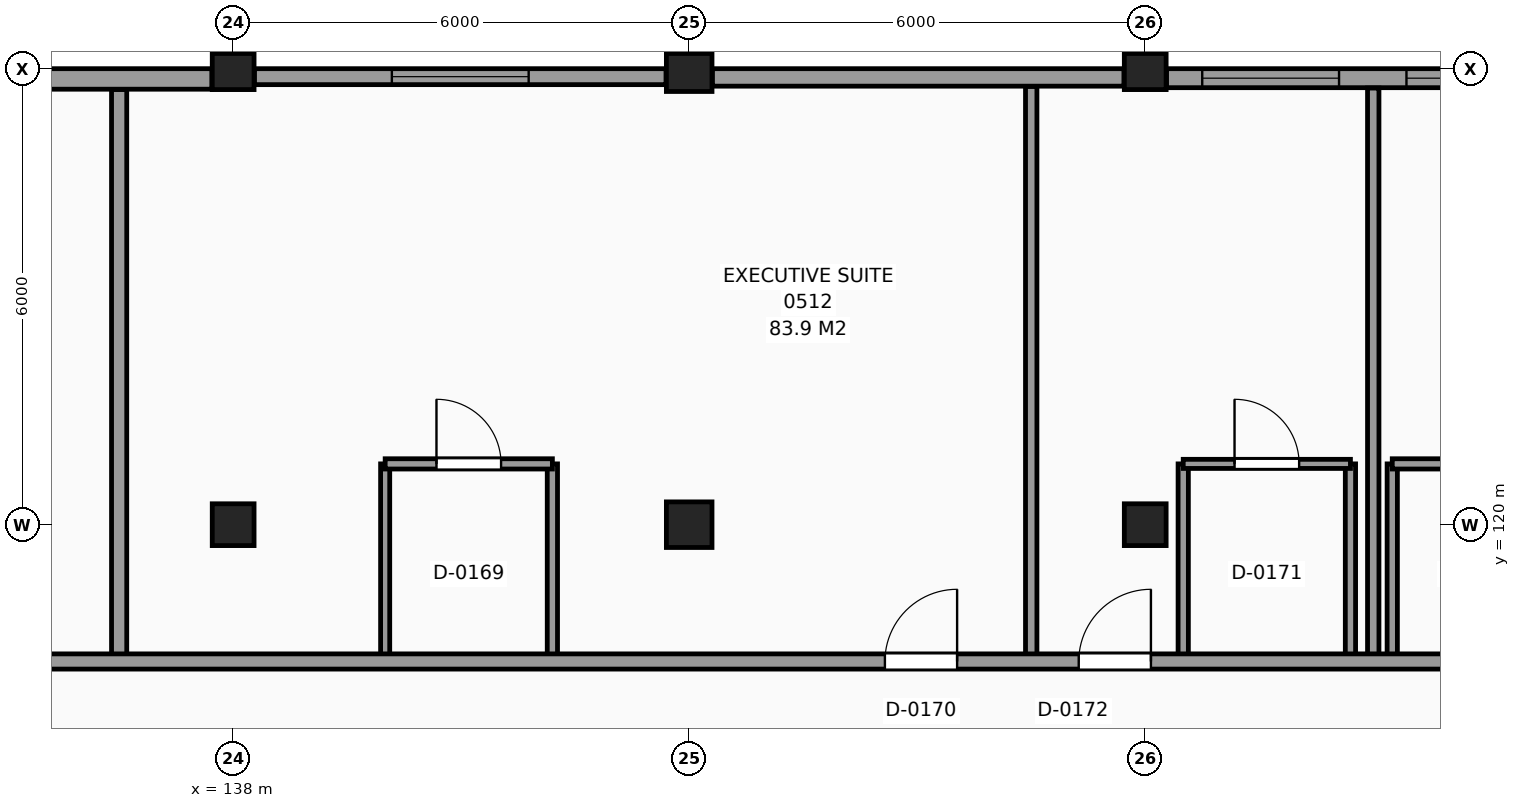
"""IFC4 building model, lengths in metres.
Left out: names, types, materials, properties, quantities, classifications, styles, units other than length and angle.
Written with IfcOpenShell. Run it as: python <this file> out.ifc"""

import sys

from ifc_helpers import new_model, si_unit, direction, frame, frame_2d, origin, origin_2d, place, context, subcontext, project, spatial, rectangle, extrude, element, fill, save


model = new_model("IFC4")
c1 = context("Model", 3, precision=1e-05, world=origin(), true_north=direction((0.0, 1.0)))
c2 = subcontext(c1, "Body", "Model", "MODEL_VIEW")
j1 = project(units=[si_unit("LENGTHUNIT", "METRE"), si_unit("PLANEANGLEUNIT", "RADIAN")], contexts=[c1])
p1 = place(None, origin())
s1 = spatial("IfcSite", under=j1, at=p1, CompositionType="ELEMENT")
p2 = place(p1, origin())
s2 = spatial("IfcBuilding", under=s1, at=p2, CompositionType="ELEMENT")
p3 = place(p2, frame((0.0, 0.0, 24.6)))
s3 = spatial("IfcBuildingStorey", under=s2, at=p3, CompositionType="ELEMENT", Elevation=24.6)
for number, where, z_axis, x_axis in (
    (1, (138.0, 120.0, 0.0), (0.0, 0.0, 1.0), (1.0, 0.0, 0.0)),
    (2, (138.0, 126.0, 0.0), (0.0, 0.0, 1.0), (1.0, 0.0, 0.0)),
):
    element("IfcColumn", number, at=place(p3, frame(where, z_axis=z_axis, x_axis=x_axis)), inside=s3, PredefinedType="COLUMN", context=c2, shape_type="SweptSolid", body=[
        extrude(rectangle(XDim=0.55, YDim=0.55, at=origin_2d()), origin(), (0.0, 0.0, 1.0), 3.6),
    ])
for number, where, z_axis, x_axis in (
    (3, (144.0, 120.0, 0.0), (0.0, 0.0, 1.0), (1.0, 0.0, 0.0)),
    (4, (144.0, 126.0, 0.0), (0.0, 0.0, 1.0), (1.0, 0.0, 0.0)),
):
    element("IfcColumn", number, at=place(p3, frame(where, z_axis=z_axis, x_axis=x_axis)), inside=s3, PredefinedType="COLUMN", context=c2, shape_type="SweptSolid", body=[
        extrude(rectangle(XDim=0.6, YDim=0.6, at=origin_2d()), origin(), (0.0, 0.0, 1.0), 3.6),
    ])
for number, where, z_axis, x_axis in (
    (5, (150.0, 120.0, 0.0), (0.0, 0.0, 1.0), (1.0, 0.0, 0.0)),
    (6, (150.0, 126.0, 0.0), (0.0, 0.0, 1.0), (1.0, 0.0, 0.0)),
):
    element("IfcColumn", number, at=place(p3, frame(where, z_axis=z_axis, x_axis=x_axis)), inside=s3, PredefinedType="COLUMN", context=c2, shape_type="SweptSolid", body=[
        extrude(rectangle(XDim=0.55, YDim=0.55, at=origin_2d()), origin(), (0.0, 0.0, 1.0), 3.6),
    ])
p4 = place(p3, frame((155.695, 125.875, 0.0), z_axis=(0.0, 0.0, 1.0), x_axis=(-1.0, 0.0, 0.0)))
e7 = element("IfcWall", 7, at=p4, inside=s3, PredefinedType="SOLIDWALL", context=c2, shape_type="SweptSolid", body=[
    extrude(rectangle(XDim=5.415, YDim=0.25, at=frame_2d((2.708, 0.0))), origin(), (0.0, 0.0, 1.0), 2.73),
])
p5 = place(p4, frame((3.145, 0.0, 0.8)))
e8 = element("IfcOpeningElement", 8, at=p5, cuts=e7, PredefinedType="OPENING", context=c2, shape_type="SweptSolid", body=[
    extrude(rectangle(XDim=1.8, YDim=1.7, at=frame_2d((0.9, 0.85))), frame((0.0, 0.135, 0.0), z_axis=(0.0, -1.0, 0.0), x_axis=(1.0, 0.0, 0.0)), (0.0, 0.0, 1.0), 0.27),
])
p6 = place(p4, frame((0.458, 0.0, 0.8)))
e9 = element("IfcOpeningElement", 9, at=p6, cuts=e7, PredefinedType="OPENING", context=c2, shape_type="SweptSolid", body=[
    extrude(rectangle(XDim=1.8, YDim=1.7, at=frame_2d((0.9, 0.85))), frame((0.0, 0.135, 0.0), z_axis=(0.0, -1.0, 0.0), x_axis=(1.0, 0.0, 0.0)), (0.0, 0.0, 1.0), 0.27),
])
p7 = place(p3, frame((149.72, 125.885, 0.0), z_axis=(0.0, 0.0, 1.0), x_axis=(-1.0, 0.0, 0.0)))
e10 = element("IfcWall", 10, at=p7, inside=s3, PredefinedType="SOLIDWALL", context=c2, shape_type="SweptSolid", body=[
    extrude(rectangle(XDim=5.415, YDim=0.23, at=frame_2d((2.708, 0.0))), origin(), (0.0, 0.0, 1.0), 2.73),
])
p8 = place(p3, frame((143.695, 125.895, 0.0), z_axis=(0.0, 0.0, 1.0), x_axis=(-1.0, 0.0, 0.0)))
e11 = element("IfcWall", 11, at=p8, inside=s3, PredefinedType="SOLIDWALL", context=c2, shape_type="SweptSolid", body=[
    extrude(rectangle(XDim=5.415, YDim=0.21, at=frame_2d((2.708, 0.0))), origin(), (0.0, 0.0, 1.0), 2.73),
])
p9 = place(p8, frame((1.807, 0.0, 0.8)))
e12 = element("IfcOpeningElement", 12, at=p9, cuts=e11, PredefinedType="OPENING", context=c2, shape_type="SweptSolid", body=[
    extrude(rectangle(XDim=1.8, YDim=1.7, at=frame_2d((0.9, 0.85))), frame((0.0, 0.115, 0.0), z_axis=(0.0, -1.0, 0.0), x_axis=(1.0, 0.0, 0.0)), (0.0, 0.0, 1.0), 0.23),
])
p10 = place(p3, frame((137.72, 125.865, 0.0), z_axis=(0.0, 0.0, 1.0), x_axis=(-1.0, 0.0, 0.0)))
e13 = element("IfcWall", 13, at=p10, inside=s3, PredefinedType="SOLIDWALL", context=c2, shape_type="SweptSolid", body=[
    extrude(rectangle(XDim=5.415, YDim=0.27, at=frame_2d((2.708, 0.0))), origin(), (0.0, 0.0, 1.0), 2.73),
])
p11 = place(p10, frame((2.407, 0.0, 0.8)))
e14 = element("IfcOpeningElement", 14, at=p11, cuts=e13, PredefinedType="OPENING", context=c2, shape_type="SweptSolid", body=[
    extrude(rectangle(XDim=1.8, YDim=1.7, at=frame_2d((0.9, 0.85))), frame((0.0, 0.145, 0.0), z_axis=(0.0, -1.0, 0.0), x_axis=(1.0, 0.0, 0.0)), (0.0, 0.0, 1.0), 0.29),
])
p12 = place(p3, frame((136.5, 118.2, 0.0), z_axis=(0.0, 0.0, 1.0), x_axis=(0.0, 1.0, 0.0)))
e15 = element("IfcWall", 15, at=p12, inside=s3, PredefinedType="PARTITIONING", context=c2, shape_type="SweptSolid", body=[
    extrude(rectangle(XDim=7.525, YDim=0.2, at=frame_2d((3.763, 0.0))), origin(), (0.0, 0.0, 1.0), 3.38),
])
p13 = place(p3, frame((140.0, 118.2, 0.0), z_axis=(0.0, 0.0, 1.0), x_axis=(0.0, 1.0, 0.0)))
e16 = element("IfcWall", 16, at=p13, inside=s3, PredefinedType="PARTITIONING", context=c2, shape_type="SweptSolid", body=[
    extrude(rectangle(XDim=2.6, YDim=0.12, at=frame_2d((1.3, 0.0))), origin(), (0.0, 0.0, 1.0), 3.38),
])
p14 = place(p3, frame((142.2, 118.2, 0.0), z_axis=(0.0, 0.0, 1.0), x_axis=(0.0, 1.0, 0.0)))
e17 = element("IfcWall", 17, at=p14, inside=s3, PredefinedType="PARTITIONING", context=c2, shape_type="SweptSolid", body=[
    extrude(rectangle(XDim=2.6, YDim=0.135, at=frame_2d((1.3, 0.0))), origin(), (0.0, 0.0, 1.0), 3.38),
])
p15 = place(p3, frame((148.5, 118.2, 0.0), z_axis=(0.0, 0.0, 1.0), x_axis=(0.0, 1.0, 0.0)))
e18 = element("IfcWall", 18, at=p15, inside=s3, PredefinedType="PARTITIONING", context=c2, shape_type="SweptSolid", body=[
    extrude(rectangle(XDim=7.565, YDim=0.15, at=frame_2d((3.782, 0.0))), origin(), (0.0, 0.0, 1.0), 3.38),
])
for number, where, z_axis, x_axis in (
    (19, (150.5, 118.2, 0.0), (0.0, 0.0, 1.0), (0.0, 1.0, 0.0)),
    (20, (152.7, 118.2, 0.0), (0.0, 0.0, 1.0), (0.0, 1.0, 0.0)),
):
    element("IfcWall", number, at=place(p3, frame(where, z_axis=z_axis, x_axis=x_axis)), inside=s3, PredefinedType="PARTITIONING", context=c2, shape_type="SweptSolid", body=[
        extrude(rectangle(XDim=2.6, YDim=0.135, at=frame_2d((1.3, 0.0))), origin(), (0.0, 0.0, 1.0), 3.38),
    ])
p16 = place(p3, frame((153.0, 118.2, 0.0), z_axis=(0.0, 0.0, 1.0), x_axis=(0.0, 1.0, 0.0)))
e21 = element("IfcWall", 21, at=p16, inside=s3, PredefinedType="PARTITIONING", context=c2, shape_type="SweptSolid", body=[
    extrude(rectangle(XDim=7.545, YDim=0.15, at=frame_2d((3.772, 0.0))), origin(), (0.0, 0.0, 1.0), 3.38),
])
p17 = place(p3, frame((153.25, 118.2, 0.0), z_axis=(0.0, 0.0, 1.0), x_axis=(0.0, 1.0, 0.0)))
e22 = element("IfcWall", 22, at=p17, inside=s3, PredefinedType="PARTITIONING", context=c2, shape_type="SweptSolid", body=[
    extrude(rectangle(XDim=2.6, YDim=0.135, at=frame_2d((1.3, 0.0))), origin(), (0.0, 0.0, 1.0), 3.38),
])
p18 = place(p3, frame((66.255, 118.2, 0.0), z_axis=(0.0, 0.0, 1.0), x_axis=(1.0, 0.0, 0.0)))
e23 = element("IfcWall", 23, at=p18, inside=s3, PredefinedType="PARTITIONING", context=c2, shape_type="SweptSolid", body=[
    extrude(rectangle(XDim=110.245, YDim=0.2, at=frame_2d((55.123, 0.0))), origin(), (0.0, 0.0, 1.0), 3.38),
])
p19 = place(p18, frame((7.57, 0.0, 0.0)))
e24 = element("IfcOpeningElement", 24, at=p19, cuts=e23, PredefinedType="OPENING", context=c2, shape_type="SweptSolid", body=[
    extrude(rectangle(XDim=0.95, YDim=2.1, at=frame_2d((0.475, 1.05))), frame((0.0, 0.11, 0.0), z_axis=(0.0, -1.0, 0.0), x_axis=(1.0, 0.0, 0.0)), (0.0, 0.0, 1.0), 0.22),
])
p20 = place(p18, frame((12.07, 0.0, 0.0)))
e25 = element("IfcOpeningElement", 25, at=p20, cuts=e23, PredefinedType="OPENING", context=c2, shape_type="SweptSolid", body=[
    extrude(rectangle(XDim=0.95, YDim=2.1, at=frame_2d((0.475, 1.05))), frame((0.0, 0.11, 0.0), z_axis=(0.0, -1.0, 0.0), x_axis=(1.0, 0.0, 0.0)), (0.0, 0.0, 1.0), 0.22),
])
p21 = place(p18, frame((16.27, 0.0, 0.0)))
e26 = element("IfcOpeningElement", 26, at=p21, cuts=e23, PredefinedType="OPENING", context=c2, shape_type="SweptSolid", body=[
    extrude(rectangle(XDim=0.95, YDim=2.1, at=frame_2d((0.475, 1.05))), frame((0.0, 0.11, 0.0), z_axis=(0.0, -1.0, 0.0), x_axis=(1.0, 0.0, 0.0)), (0.0, 0.0, 1.0), 0.22),
])
p22 = place(p18, frame((18.47, 0.0, 0.0)))
e27 = element("IfcOpeningElement", 27, at=p22, cuts=e23, PredefinedType="OPENING", context=c2, shape_type="SweptSolid", body=[
    extrude(rectangle(XDim=0.95, YDim=2.1, at=frame_2d((0.475, 1.05))), frame((0.0, 0.11, 0.0), z_axis=(0.0, -1.0, 0.0), x_axis=(1.0, 0.0, 0.0)), (0.0, 0.0, 1.0), 0.22),
])
p23 = place(p18, frame((32.32, 0.0, 0.0)))
e28 = element("IfcOpeningElement", 28, at=p23, cuts=e23, PredefinedType="OPENING", context=c2, shape_type="SweptSolid", body=[
    extrude(rectangle(XDim=0.95, YDim=2.1, at=frame_2d((0.475, 1.05))), frame((0.0, 0.11, 0.0), z_axis=(0.0, -1.0, 0.0), x_axis=(1.0, 0.0, 0.0)), (0.0, 0.0, 1.0), 0.22),
])
p24 = place(p18, frame((36.47, 0.0, 0.0)))
e29 = element("IfcOpeningElement", 29, at=p24, cuts=e23, PredefinedType="OPENING", context=c2, shape_type="SweptSolid", body=[
    extrude(rectangle(XDim=0.95, YDim=2.1, at=frame_2d((0.475, 1.05))), frame((0.0, 0.11, 0.0), z_axis=(0.0, -1.0, 0.0), x_axis=(1.0, 0.0, 0.0)), (0.0, 0.0, 1.0), 0.22),
])
p25 = place(p18, frame((46.27, 0.0, 0.0)))
e30 = element("IfcOpeningElement", 30, at=p25, cuts=e23, PredefinedType="OPENING", context=c2, shape_type="SweptSolid", body=[
    extrude(rectangle(XDim=0.95, YDim=2.1, at=frame_2d((0.475, 1.05))), frame((0.0, 0.11, 0.0), z_axis=(0.0, -1.0, 0.0), x_axis=(1.0, 0.0, 0.0)), (0.0, 0.0, 1.0), 0.22),
])
p26 = place(p18, frame((48.47, 0.0, 0.0)))
e31 = element("IfcOpeningElement", 31, at=p26, cuts=e23, PredefinedType="OPENING", context=c2, shape_type="SweptSolid", body=[
    extrude(rectangle(XDim=0.95, YDim=2.1, at=frame_2d((0.475, 1.05))), frame((0.0, 0.11, 0.0), z_axis=(0.0, -1.0, 0.0), x_axis=(1.0, 0.0, 0.0)), (0.0, 0.0, 1.0), 0.22),
])
p27 = place(p18, frame((52.87, 0.0, 0.0)))
e32 = element("IfcOpeningElement", 32, at=p27, cuts=e23, PredefinedType="OPENING", context=c2, shape_type="SweptSolid", body=[
    extrude(rectangle(XDim=0.95, YDim=2.1, at=frame_2d((0.475, 1.05))), frame((0.0, 0.11, 0.0), z_axis=(0.0, -1.0, 0.0), x_axis=(1.0, 0.0, 0.0)), (0.0, 0.0, 1.0), 0.22),
])
p28 = place(p18, frame((60.07, 0.0, 0.0)))
e33 = element("IfcOpeningElement", 33, at=p28, cuts=e23, PredefinedType="OPENING", context=c2, shape_type="SweptSolid", body=[
    extrude(rectangle(XDim=0.95, YDim=2.1, at=frame_2d((0.475, 1.05))), frame((0.0, 0.11, 0.0), z_axis=(0.0, -1.0, 0.0), x_axis=(1.0, 0.0, 0.0)), (0.0, 0.0, 1.0), 0.22),
])
p29 = place(p18, frame((68.32, 0.0, 0.0)))
e34 = element("IfcOpeningElement", 34, at=p29, cuts=e23, PredefinedType="OPENING", context=c2, shape_type="SweptSolid", body=[
    extrude(rectangle(XDim=0.95, YDim=2.1, at=frame_2d((0.475, 1.05))), frame((0.0, 0.11, 0.0), z_axis=(0.0, -1.0, 0.0), x_axis=(1.0, 0.0, 0.0)), (0.0, 0.0, 1.0), 0.22),
])
p30 = place(p18, frame((80.32, 0.0, 0.0)))
e35 = element("IfcOpeningElement", 35, at=p30, cuts=e23, PredefinedType="OPENING", context=c2, shape_type="SweptSolid", body=[
    extrude(rectangle(XDim=0.95, YDim=2.1, at=frame_2d((0.475, 1.05))), frame((0.0, 0.11, 0.0), z_axis=(0.0, -1.0, 0.0), x_axis=(1.0, 0.0, 0.0)), (0.0, 0.0, 1.0), 0.22),
])
p31 = place(p18, frame((82.87, 0.0, 0.0)))
e36 = element("IfcOpeningElement", 36, at=p31, cuts=e23, PredefinedType="OPENING", context=c2, shape_type="SweptSolid", body=[
    extrude(rectangle(XDim=0.95, YDim=2.1, at=frame_2d((0.475, 1.05))), frame((0.0, 0.11, 0.0), z_axis=(0.0, -1.0, 0.0), x_axis=(1.0, 0.0, 0.0)), (0.0, 0.0, 1.0), 0.22),
])
p32 = place(p18, frame((90.07, 0.0, 0.0)))
e37 = element("IfcOpeningElement", 37, at=p32, cuts=e23, PredefinedType="OPENING", context=c2, shape_type="SweptSolid", body=[
    extrude(rectangle(XDim=0.95, YDim=2.1, at=frame_2d((0.475, 1.05))), frame((0.0, 0.11, 0.0), z_axis=(0.0, -1.0, 0.0), x_axis=(1.0, 0.0, 0.0)), (0.0, 0.0, 1.0), 0.22),
])
p33 = place(p18, frame((94.27, 0.0, 0.0)))
e38 = element("IfcOpeningElement", 38, at=p33, cuts=e23, PredefinedType="OPENING", context=c2, shape_type="SweptSolid", body=[
    extrude(rectangle(XDim=0.95, YDim=2.1, at=frame_2d((0.475, 1.05))), frame((0.0, 0.11, 0.0), z_axis=(0.0, -1.0, 0.0), x_axis=(1.0, 0.0, 0.0)), (0.0, 0.0, 1.0), 0.22),
])
p34 = place(p18, frame((103.57, 0.0, 0.0)))
e39 = element("IfcOpeningElement", 39, at=p34, cuts=e23, PredefinedType="OPENING", context=c2, shape_type="SweptSolid", body=[
    extrude(rectangle(XDim=0.95, YDim=2.1, at=frame_2d((0.475, 1.05))), frame((0.0, 0.11, 0.0), z_axis=(0.0, -1.0, 0.0), x_axis=(1.0, 0.0, 0.0)), (0.0, 0.0, 1.0), 0.22),
])
p35 = place(p18, frame((104.97, 0.0, 0.0)))
e40 = element("IfcOpeningElement", 40, at=p35, cuts=e23, PredefinedType="OPENING", context=c2, shape_type="SweptSolid", body=[
    extrude(rectangle(XDim=0.95, YDim=2.1, at=frame_2d((0.475, 1.05))), frame((0.0, 0.11, 0.0), z_axis=(0.0, -1.0, 0.0), x_axis=(1.0, 0.0, 0.0)), (0.0, 0.0, 1.0), 0.22),
])
p36 = place(p3, frame((140.0, 120.8, 0.0), z_axis=(0.0, 0.0, 1.0), x_axis=(1.0, 0.0, 0.0)))
e41 = element("IfcWall", 41, at=p36, inside=s3, PredefinedType="PARTITIONING", context=c2, shape_type="SweptSolid", body=[
    extrude(rectangle(XDim=2.2, YDim=0.135, at=frame_2d((1.1, 0.0))), origin(), (0.0, 0.0, 1.0), 3.38),
])
p37 = place(p36, frame((0.675, 0.0, 0.0)))
e42 = element("IfcOpeningElement", 42, at=p37, cuts=e41, PredefinedType="OPENING", context=c2, shape_type="SweptSolid", body=[
    extrude(rectangle(XDim=0.85, YDim=2.1, at=frame_2d((0.425, 1.05))), frame((0.0, 0.078, 0.0), z_axis=(0.0, -1.0, 0.0), x_axis=(1.0, 0.0, 0.0)), (0.0, 0.0, 1.0), 0.155),
])
p38 = place(p3, frame((150.5, 120.8, 0.0), z_axis=(0.0, 0.0, 1.0), x_axis=(1.0, 0.0, 0.0)))
e43 = element("IfcWall", 43, at=p38, inside=s3, PredefinedType="PARTITIONING", context=c2, shape_type="SweptSolid", body=[
    extrude(rectangle(XDim=2.2, YDim=0.12, at=frame_2d((1.1, 0.0))), origin(), (0.0, 0.0, 1.0), 3.38),
])
p39 = place(p38, frame((0.675, 0.0, 0.0)))
e44 = element("IfcOpeningElement", 44, at=p39, cuts=e43, PredefinedType="OPENING", context=c2, shape_type="SweptSolid", body=[
    extrude(rectangle(XDim=0.85, YDim=2.1, at=frame_2d((0.425, 1.05))), frame((0.0, 0.07, 0.0), z_axis=(0.0, -1.0, 0.0), x_axis=(1.0, 0.0, 0.0)), (0.0, 0.0, 1.0), 0.14),
])
p40 = place(p3, frame((153.25, 120.8, 0.0), z_axis=(0.0, 0.0, 1.0), x_axis=(1.0, 0.0, 0.0)))
e45 = element("IfcWall", 45, at=p40, inside=s3, PredefinedType="PARTITIONING", context=c2, shape_type="SweptSolid", body=[
    extrude(rectangle(XDim=2.2, YDim=0.135, at=frame_2d((1.1, 0.0))), origin(), (0.0, 0.0, 1.0), 3.38),
])
p41 = place(p40, frame((0.675, 0.0, 0.0)))
e46 = element("IfcOpeningElement", 46, at=p41, cuts=e45, PredefinedType="OPENING", context=c2, shape_type="SweptSolid", body=[
    extrude(rectangle(XDim=0.85, YDim=2.1, at=frame_2d((0.425, 1.05))), frame((0.0, 0.078, 0.0), z_axis=(0.0, -1.0, 0.0), x_axis=(1.0, 0.0, 0.0)), (0.0, 0.0, 1.0), 0.155),
])
p42 = place(p9, origin())
e47 = element("IfcWindow", 47, at=p42, inside=s3, PartitioningType="SINGLE_PANEL", PredefinedType="WINDOW", context=c2, shape_type="SweptSolid", body=[
    extrude(rectangle(XDim=1.8, YDim=1.7, at=frame_2d((0.9, 0.85))), frame((0.0, 0.03, 0.0), z_axis=(0.0, -1.0, 0.0), x_axis=(1.0, 0.0, 0.0)), (0.0, 0.0, 1.0), 0.06),
])
fill(e12, e47)
p43 = place(p5, origin())
e48 = element("IfcWindow", 48, at=p43, inside=s3, PartitioningType="SINGLE_PANEL", PredefinedType="WINDOW", context=c2, shape_type="SweptSolid", body=[
    extrude(rectangle(XDim=1.8, YDim=1.7, at=frame_2d((0.9, 0.85))), frame((0.0, 0.03, 0.0), z_axis=(0.0, -1.0, 0.0), x_axis=(1.0, 0.0, 0.0)), (0.0, 0.0, 1.0), 0.06),
])
fill(e8, e48)
p44 = place(p6, origin())
e49 = element("IfcWindow", 49, at=p44, inside=s3, PartitioningType="SINGLE_PANEL", PredefinedType="WINDOW", context=c2, shape_type="SweptSolid", body=[
    extrude(rectangle(XDim=1.8, YDim=1.7, at=frame_2d((0.9, 0.85))), frame((0.0, 0.03, 0.0), z_axis=(0.0, -1.0, 0.0), x_axis=(1.0, 0.0, 0.0)), (0.0, 0.0, 1.0), 0.06),
])
fill(e9, e49)
p45 = place(p37, origin())
e50 = element("IfcDoor", 50, at=p45, inside=s3, OperationType="SINGLE_SWING_LEFT", PredefinedType="DOOR", context=c2, shape_type="SweptSolid", body=[
    extrude(rectangle(XDim=0.85, YDim=2.1, at=frame_2d((0.425, 1.05))), frame((0.0, 0.025, 0.0), z_axis=(0.0, -1.0, 0.0), x_axis=(1.0, 0.0, 0.0)), (0.0, 0.0, 1.0), 0.05),
])
fill(e42, e50)
p46 = place(p30, origin())
e51 = element("IfcDoor", 51, at=p46, inside=s3, OperationType="SINGLE_SWING_RIGHT", PredefinedType="DOOR", context=c2, shape_type="SweptSolid", body=[
    extrude(rectangle(XDim=0.95, YDim=2.1, at=frame_2d((0.475, 1.05))), frame((0.0, 0.025, 0.0), z_axis=(0.0, -1.0, 0.0), x_axis=(1.0, 0.0, 0.0)), (0.0, 0.0, 1.0), 0.05),
])
fill(e35, e51)
p47 = place(p39, origin())
e52 = element("IfcDoor", 52, at=p47, inside=s3, OperationType="SINGLE_SWING_LEFT", PredefinedType="DOOR", context=c2, shape_type="SweptSolid", body=[
    extrude(rectangle(XDim=0.85, YDim=2.1, at=frame_2d((0.425, 1.05))), frame((0.0, 0.025, 0.0), z_axis=(0.0, -1.0, 0.0), x_axis=(1.0, 0.0, 0.0)), (0.0, 0.0, 1.0), 0.05),
])
fill(e44, e52)
p48 = place(p31, origin())
e53 = element("IfcDoor", 53, at=p48, inside=s3, OperationType="SINGLE_SWING_RIGHT", PredefinedType="DOOR", context=c2, shape_type="SweptSolid", body=[
    extrude(rectangle(XDim=0.95, YDim=2.1, at=frame_2d((0.475, 1.05))), frame((0.0, 0.025, 0.0), z_axis=(0.0, -1.0, 0.0), x_axis=(1.0, 0.0, 0.0)), (0.0, 0.0, 1.0), 0.05),
])
fill(e36, e53)
save(model, sys.argv[1])
